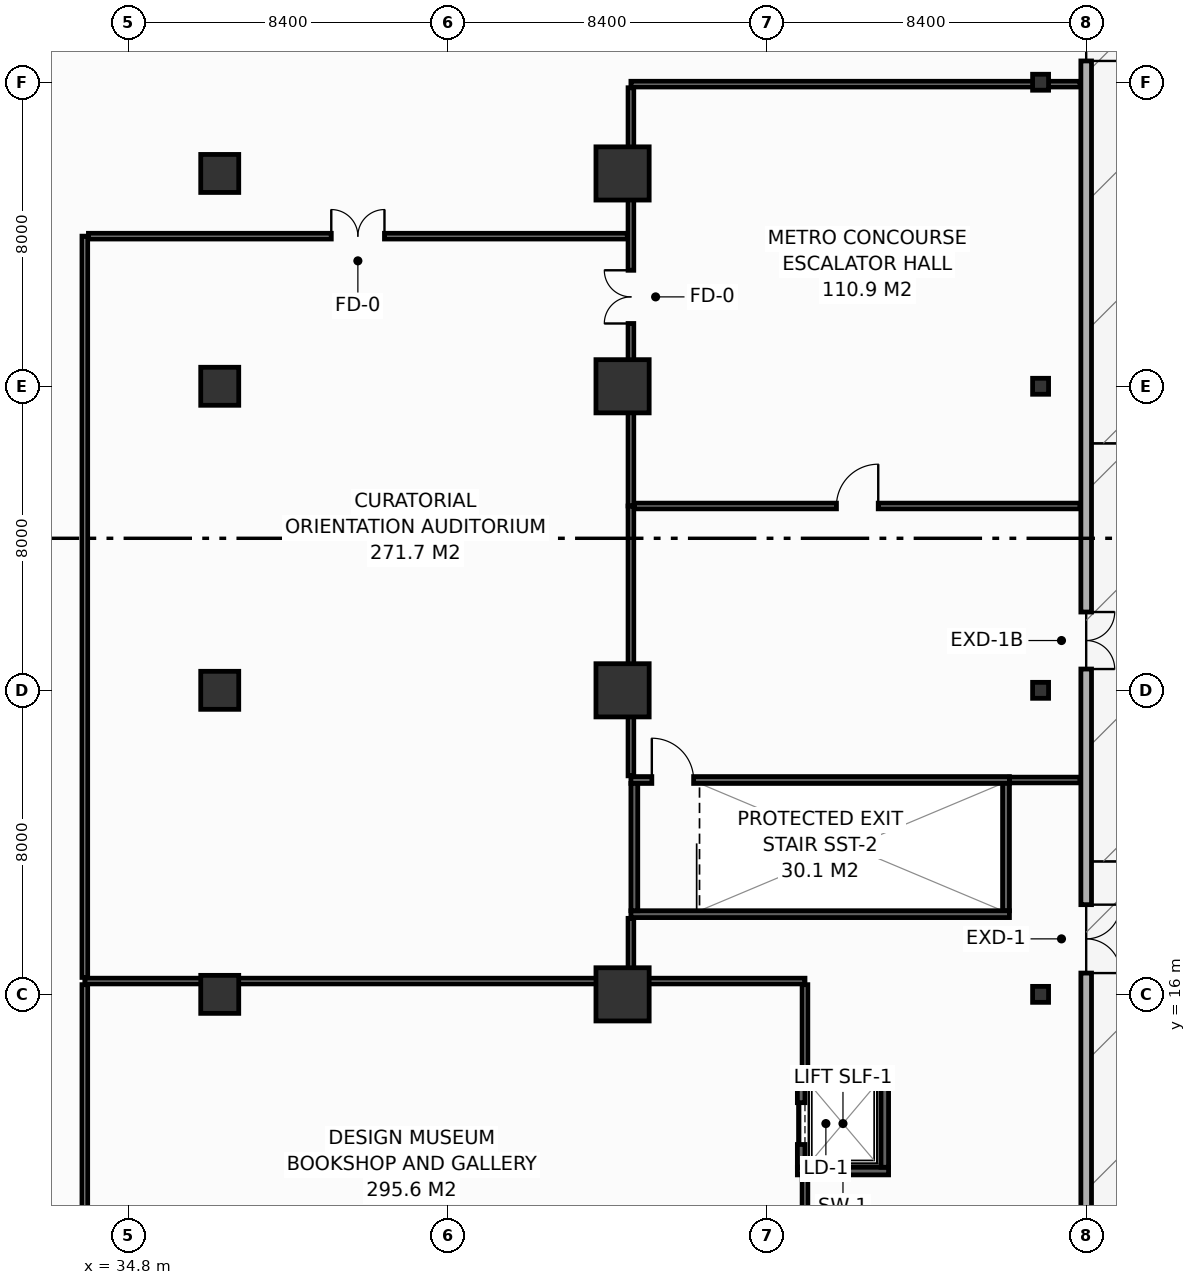
"""IFC4 building model, lengths in metres.
Left out: names, types, materials, properties, quantities, classifications, styles, units other than length and angle.
Written with IfcOpenShell. Run it as: python <this file> out.ifc"""

import sys

from ifc_helpers import new_model, si_unit, direction, frame, frame_2d, origin, origin_2d, place, context, subcontext, project, spatial, rectangle, hollow_rectangle, i_section, extrude, element, fill, save


model = new_model("IFC4")
c1 = context("Model", 3, precision=1e-05, world=origin(), true_north=direction((0.0, 1.0)))
c2 = subcontext(c1, "Body", "Model", "MODEL_VIEW")
j1 = project(units=[si_unit("LENGTHUNIT", "METRE"), si_unit("PLANEANGLEUNIT", "RADIAN")], contexts=[c1])
p1 = place(None, origin())
s1 = spatial("IfcSite", under=j1, at=p1, CompositionType="ELEMENT")
p2 = place(p1, origin())
s2 = spatial("IfcBuilding", under=s1, at=p2, CompositionType="ELEMENT")
p3 = place(p2, origin())
s3 = spatial("IfcBuildingStorey", under=s2, at=p3, CompositionType="ELEMENT", Elevation=0.0)
p4 = place(p3, frame((37.2, 16.0, 0.0), z_axis=(0.0, 0.0, 1.0), x_axis=(1.0, 0.0, 0.0)))
e1 = element("IfcColumn", 1, at=p4, inside=s3, PredefinedType="COLUMN", context=c2, shape_type="SweptSolid", body=[
    extrude(hollow_rectangle(XDim=1.0, YDim=1.0, WallThickness=0.045, at=origin_2d()), origin(), (0.0, 0.0, 1.0), 6.0),
])
p5 = place(p3, frame((47.8, 16.0, 0.0), z_axis=(0.0, 0.0, 1.0), x_axis=(1.0, 0.0, 0.0)))
e2 = element("IfcColumn", 2, at=p5, inside=s3, PredefinedType="COLUMN", context=c2, shape_type="SweptSolid", body=[
    extrude(hollow_rectangle(XDim=1.4, YDim=1.4, WallThickness=0.065, at=origin_2d()), origin(), (0.0, 0.0, 1.0), 6.0),
])
p6 = place(p3, frame((37.2, 24.0, 0.0), z_axis=(0.0, 0.0, 1.0), x_axis=(1.0, 0.0, 0.0)))
e3 = element("IfcColumn", 3, at=p6, inside=s3, PredefinedType="COLUMN", context=c2, shape_type="SweptSolid", body=[
    extrude(hollow_rectangle(XDim=1.0, YDim=1.0, WallThickness=0.045, at=origin_2d()), origin(), (0.0, 0.0, 1.0), 6.0),
])
p7 = place(p3, frame((47.8, 24.0, 0.0), z_axis=(0.0, 0.0, 1.0), x_axis=(1.0, 0.0, 0.0)))
e4 = element("IfcColumn", 4, at=p7, inside=s3, PredefinedType="COLUMN", context=c2, shape_type="SweptSolid", body=[
    extrude(hollow_rectangle(XDim=1.4, YDim=1.4, WallThickness=0.065, at=origin_2d()), origin(), (0.0, 0.0, 1.0), 6.0),
])
p8 = place(p3, frame((37.2, 32.0, 0.0), z_axis=(0.0, 0.0, 1.0), x_axis=(1.0, 0.0, 0.0)))
e5 = element("IfcColumn", 5, at=p8, inside=s3, PredefinedType="COLUMN", context=c2, shape_type="SweptSolid", body=[
    extrude(hollow_rectangle(XDim=1.0, YDim=1.0, WallThickness=0.045, at=origin_2d()), origin(), (0.0, 0.0, 1.0), 6.0),
])
p9 = place(p3, frame((47.8, 32.0, 0.0), z_axis=(0.0, 0.0, 1.0), x_axis=(1.0, 0.0, 0.0)))
e6 = element("IfcColumn", 6, at=p9, inside=s3, PredefinedType="COLUMN", context=c2, shape_type="SweptSolid", body=[
    extrude(hollow_rectangle(XDim=1.4, YDim=1.4, WallThickness=0.065, at=origin_2d()), origin(), (0.0, 0.0, 1.0), 6.0),
])
p10 = place(p3, frame((37.2, 37.6, 0.0), z_axis=(0.0, 0.0, 1.0), x_axis=(1.0, 0.0, 0.0)))
e7 = element("IfcColumn", 7, at=p10, inside=s3, PredefinedType="COLUMN", context=c2, shape_type="SweptSolid", body=[
    extrude(hollow_rectangle(XDim=1.0, YDim=1.0, WallThickness=0.045, at=origin_2d()), origin(), (0.0, 0.0, 1.0), 6.0),
])
p11 = place(p3, frame((47.8, 37.6, 0.0), z_axis=(0.0, 0.0, 1.0), x_axis=(1.0, 0.0, 0.0)))
e8 = element("IfcColumn", 8, at=p11, inside=s3, PredefinedType="COLUMN", context=c2, shape_type="SweptSolid", body=[
    extrude(hollow_rectangle(XDim=1.4, YDim=1.4, WallThickness=0.065, at=origin_2d()), origin(), (0.0, 0.0, 1.0), 6.0),
])
for number, where, z_axis, x_axis in (
    (9, (58.8, 16.0, 0.0), (0.0, 0.0, 1.0), (1.0, 0.0, 0.0)),
    (10, (58.8, 24.0, 0.0), (0.0, 0.0, 1.0), (1.0, 0.0, 0.0)),
    (11, (58.8, 32.0, 0.0), (0.0, 0.0, 1.0), (1.0, 0.0, 0.0)),
    (12, (58.8, 40.0, 0.0), (0.0, 0.0, 1.0), (1.0, 0.0, 0.0)),
):
    element("IfcColumn", number, at=place(p3, frame(where, z_axis=z_axis, x_axis=x_axis)), inside=s3, PredefinedType="COLUMN", context=c2, shape_type="SweptSolid", body=[
        extrude(i_section(OverallWidth=0.42, OverallDepth=0.42, WebThickness=0.02, FlangeThickness=0.035, FilletRadius=0.022, at=origin_2d()), origin(), (0.0, 0.0, 1.0), 6.0),
    ])
for number, where, z_axis, x_axis in (
    (13, (52.4, 11.35, 0.0), (0.0, 0.0, 1.0), (1.0, 0.0, 0.0)),
    (14, (52.4, 13.85, 0.0), (0.0, 0.0, 1.0), (1.0, 0.0, 0.0)),
):
    element("IfcWall", number, at=place(p3, frame(where, z_axis=z_axis, x_axis=x_axis)), inside=s3, PredefinedType="SHEAR", context=c2, shape_type="SweptSolid", body=[
        extrude(rectangle(XDim=2.4, YDim=0.2, at=frame_2d((1.2, 0.0))), origin(), (0.0, 0.0, 1.0), 5.48),
    ])
p12 = place(p3, frame((52.5, 11.45, 0.0), z_axis=(0.0, 0.0, 1.0), x_axis=(0.0, 1.0, 0.0)))
e15 = element("IfcWall", 15, at=p12, inside=s3, PredefinedType="SHEAR", context=c2, shape_type="SweptSolid", body=[
    extrude(rectangle(XDim=2.3, YDim=0.2, at=frame_2d((1.15, 0.0))), origin(), (0.0, 0.0, 1.0), 5.48),
])
p13 = place(p12, frame((0.6, 0.0, 0.0)))
e16 = element("IfcOpeningElement", 16, at=p13, cuts=e15, PredefinedType="OPENING", context=c2, shape_type="SweptSolid", body=[
    extrude(rectangle(XDim=1.1, YDim=2.2, at=frame_2d((0.55, 1.1))), frame((0.0, 0.11, 0.0), z_axis=(0.0, -1.0, 0.0), x_axis=(1.0, 0.0, 0.0)), (0.0, 0.0, 1.0), 0.22),
])
p14 = place(p3, frame((54.7, 11.45, 0.0), z_axis=(0.0, 0.0, 1.0), x_axis=(0.0, 1.0, 0.0)))
e17 = element("IfcWall", 17, at=p14, inside=s3, PredefinedType="SHEAR", context=c2, shape_type="SweptSolid", body=[
    extrude(rectangle(XDim=2.3, YDim=0.2, at=frame_2d((1.15, 0.0))), origin(), (0.0, 0.0, 1.0), 5.48),
])
p15 = place(p3, frame((48.02, 21.64, 0.0), z_axis=(0.0, 0.0, 1.0), x_axis=(1.0, 0.0, 0.0)))
e18 = element("IfcWall", 18, at=p15, inside=s3, PredefinedType="SHEAR", context=c2, shape_type="SweptSolid", body=[
    extrude(rectangle(XDim=9.96, YDim=0.18, at=frame_2d((4.98, 0.0))), origin(), (0.0, 0.0, 1.0), 5.7),
])
p16 = place(p15, frame((0.55, 0.0, 0.0)))
e19 = element("IfcOpeningElement", 19, at=p16, cuts=e18, PredefinedType="OPENING", context=c2, shape_type="SweptSolid", body=[
    extrude(rectangle(XDim=1.1, YDim=2.15, at=frame_2d((0.55, 1.075))), frame((0.0, 0.1, 0.0), z_axis=(0.0, -1.0, 0.0), x_axis=(1.0, 0.0, 0.0)), (0.0, 0.0, 1.0), 0.2),
])
p17 = place(p3, frame((57.89, 21.55, 0.0), z_axis=(0.0, 0.0, 1.0), x_axis=(0.0, -1.0, 0.0)))
e20 = element("IfcWall", 20, at=p17, inside=s3, PredefinedType="SHEAR", context=c2, shape_type="SweptSolid", body=[
    extrude(rectangle(XDim=3.35, YDim=0.18, at=frame_2d((1.675, 0.0))), origin(), (0.0, 0.0, 1.0), 5.7),
])
p18 = place(p3, frame((57.98, 18.11, 0.0), z_axis=(0.0, 0.0, 1.0), x_axis=(-1.0, 0.0, 0.0)))
e21 = element("IfcWall", 21, at=p18, inside=s3, PredefinedType="SHEAR", context=c2, shape_type="SweptSolid", body=[
    extrude(rectangle(XDim=9.96, YDim=0.18, at=frame_2d((4.98, 0.0))), origin(), (0.0, 0.0, 1.0), 5.7),
])
p19 = place(p3, frame((48.11, 18.2, 0.0), z_axis=(0.0, 0.0, 1.0), x_axis=(0.0, 1.0, 0.0)))
e22 = element("IfcWall", 22, at=p19, inside=s3, PredefinedType="SHEAR", context=c2, shape_type="SweptSolid", body=[
    extrude(rectangle(XDim=3.35, YDim=0.18, at=frame_2d((1.675, 0.0))), origin(), (0.0, 0.0, 1.0), 5.7),
])
p20 = place(p3, frame((60.0, 52.64, 0.0), z_axis=(0.0, 0.0, 1.0), x_axis=(0.0, -1.0, 0.0)))
e23 = element("IfcWall", 23, at=p20, inside=s3, PredefinedType="STANDARD", context=c2, shape_type="SweptSolid", body=[
    extrude(rectangle(XDim=49.28, YDim=0.28, at=frame_2d((24.64, 0.0))), origin(), (0.0, 0.0, 1.0), 5.7),
])
p21 = place(p20, frame((34.28, 0.0, 0.0)))
e24 = element("IfcOpeningElement", 24, at=p21, cuts=e23, PredefinedType="OPENING", context=c2, shape_type="SweptSolid", body=[
    extrude(rectangle(XDim=1.8, YDim=2.4, at=frame_2d((0.9, 1.2))), frame((0.0, 0.15, 0.0), z_axis=(0.0, -1.0, 0.0), x_axis=(1.0, 0.0, 0.0)), (0.0, 0.0, 1.0), 0.3),
])
p22 = place(p20, frame((26.58, 0.0, 0.0)))
e25 = element("IfcOpeningElement", 25, at=p22, cuts=e23, PredefinedType="OPENING", context=c2, shape_type="SweptSolid", body=[
    extrude(rectangle(XDim=1.5, YDim=2.35, at=frame_2d((0.75, 1.175))), frame((0.0, 0.15, 0.0), z_axis=(0.0, -1.0, 0.0), x_axis=(1.0, 0.0, 0.0)), (0.0, 0.0, 1.0), 0.3),
])
p23 = place(p20, frame((10.88, 0.0, 0.0)))
e26 = element("IfcOpeningElement", 26, at=p23, cuts=e23, PredefinedType="OPENING", context=c2, shape_type="SweptSolid", body=[
    extrude(rectangle(XDim=1.2, YDim=2.25, at=frame_2d((0.6, 1.125))), frame((0.0, 0.15, 0.0), z_axis=(0.0, -1.0, 0.0), x_axis=(1.0, 0.0, 0.0)), (0.0, 0.0, 1.0), 0.3),
])
p24 = place(p3, frame((48.02, 39.95, 0.0), z_axis=(0.0, 0.0, 1.0), x_axis=(1.0, 0.0, 0.0)))
e27 = element("IfcWall", 27, at=p24, inside=s3, PredefinedType="PARTITIONING", context=c2, shape_type="SweptSolid", body=[
    extrude(rectangle(XDim=11.82, YDim=0.15, at=frame_2d((5.91, 0.0))), origin(), (0.0, 0.0, 1.0), 4.785),
])
p25 = place(p3, frame((48.02, 28.85, 0.0), z_axis=(0.0, 0.0, 1.0), x_axis=(0.0, 1.0, 0.0)))
e28 = element("IfcWall", 28, at=p25, inside=s3, PredefinedType="PARTITIONING", context=c2, shape_type="SweptSolid", body=[
    extrude(rectangle(XDim=11.005, YDim=0.15, at=frame_2d((5.502, 0.0))), origin(), (0.0, 0.0, 1.0), 4.785),
])
p26 = place(p25, frame((4.802, 0.0, 0.0)))
e29 = element("IfcOpeningElement", 29, at=p26, cuts=e28, PredefinedType="OPENING", context=c2, shape_type="SweptSolid", body=[
    extrude(rectangle(XDim=1.4, YDim=2.2, at=frame_2d((0.7, 1.1))), frame((0.0, 0.085, 0.0), z_axis=(0.0, -1.0, 0.0), x_axis=(1.0, 0.0, 0.0)), (0.0, 0.0, 1.0), 0.17),
])
p27 = place(p3, frame((33.65, 16.35, 0.0), z_axis=(0.0, 0.0, 1.0), x_axis=(1.0, 0.0, 0.0)))
e30 = element("IfcWall", 30, at=p27, inside=s3, PredefinedType="PARTITIONING", context=c2, shape_type="SweptSolid", body=[
    extrude(rectangle(XDim=18.95, YDim=0.15, at=frame_2d((9.475, 0.0))), origin(), (0.0, 0.0, 1.0), 4.285),
])
p28 = place(p3, frame((52.6, 0.16, 0.0), z_axis=(0.0, 0.0, 1.0), x_axis=(0.0, 1.0, 0.0)))
e31 = element("IfcWall", 31, at=p28, inside=s3, PredefinedType="PARTITIONING", context=c2, shape_type="SweptSolid", body=[
    extrude(rectangle(XDim=11.07, YDim=0.15, at=frame_2d((5.535, 0.0))), origin(), (0.0, 0.0, 1.0), 4.785),
])
p29 = place(p3, frame((52.6, 13.97, 0.0), z_axis=(0.0, 0.0, 1.0), x_axis=(0.0, 1.0, 0.0)))
e32 = element("IfcWall", 32, at=p29, inside=s3, PredefinedType="PARTITIONING", context=c2, shape_type="SweptSolid", body=[
    extrude(rectangle(XDim=2.285, YDim=0.15, at=frame_2d((1.143, 0.0))), origin(), (0.0, 0.0, 1.0), 4.785),
])
p30 = place(p3, frame((33.65, 0.16, 0.0), z_axis=(0.0, 0.0, 1.0), x_axis=(0.0, 1.0, 0.0)))
e33 = element("IfcWall", 33, at=p30, inside=s3, PredefinedType="PARTITIONING", context=c2, shape_type="SweptSolid", body=[
    extrude(rectangle(XDim=16.095, YDim=0.15, at=frame_2d((8.047, 0.0))), origin(), (0.0, 0.0, 1.0), 4.285),
])
p31 = place(p30, frame((7.297, 0.0, 0.0)))
e34 = element("IfcOpeningElement", 34, at=p31, cuts=e33, PredefinedType="OPENING", context=c2, shape_type="SweptSolid", body=[
    extrude(rectangle(XDim=1.5, YDim=2.2, at=frame_2d((0.75, 1.1))), frame((0.0, 0.085, 0.0), z_axis=(0.0, -1.0, 0.0), x_axis=(1.0, 0.0, 0.0)), (0.0, 0.0, 1.0), 0.17),
])
p32 = place(p3, frame((33.65, 16.445, 0.0), z_axis=(0.0, 0.0, 1.0), x_axis=(0.0, 1.0, 0.0)))
e35 = element("IfcWall", 35, at=p32, inside=s3, PredefinedType="PARTITIONING", context=c2, shape_type="SweptSolid", body=[
    extrude(rectangle(XDim=19.505, YDim=0.15, at=frame_2d((9.752, 0.0))), origin(), (0.0, 0.0, 1.0), 5.185),
])
p33 = place(p3, frame((48.02, 21.75, 0.0), z_axis=(0.0, 0.0, 1.0), x_axis=(0.0, 1.0, 0.0)))
e36 = element("IfcWall", 36, at=p33, inside=s3, PredefinedType="PARTITIONING", context=c2, shape_type="SweptSolid", body=[
    extrude(rectangle(XDim=7.1, YDim=0.15, at=frame_2d((3.55, 0.0))), origin(), (0.0, 0.0, 1.0), 4.785),
])
p34 = place(p3, frame((48.02, 16.445, 0.0), z_axis=(0.0, 0.0, 1.0), x_axis=(0.0, 1.0, 0.0)))
e37 = element("IfcWall", 37, at=p34, inside=s3, PredefinedType="PARTITIONING", context=c2, shape_type="SweptSolid", body=[
    extrude(rectangle(XDim=1.555, YDim=0.15, at=frame_2d((0.777, 0.0))), origin(), (0.0, 0.0, 1.0), 4.785),
])
p35 = place(p3, frame((33.745, 35.95, 0.0), z_axis=(0.0, 0.0, 1.0), x_axis=(1.0, 0.0, 0.0)))
e38 = element("IfcWall", 38, at=p35, inside=s3, PredefinedType="PARTITIONING", context=c2, shape_type="SweptSolid", body=[
    extrude(rectangle(XDim=14.18, YDim=0.15, at=frame_2d((7.09, 0.0))), origin(), (0.0, 0.0, 1.0), 4.785),
])
p36 = place(p35, frame((6.39, 0.0, 0.0)))
e39 = element("IfcOpeningElement", 39, at=p36, cuts=e38, PredefinedType="OPENING", context=c2, shape_type="SweptSolid", body=[
    extrude(rectangle(XDim=1.4, YDim=2.2, at=frame_2d((0.7, 1.1))), frame((0.0, 0.085, 0.0), z_axis=(0.0, -1.0, 0.0), x_axis=(1.0, 0.0, 0.0)), (0.0, 0.0, 1.0), 0.17),
])
p37 = place(p3, frame((57.98, 21.64, 0.0), z_axis=(0.0, 0.0, 1.0), x_axis=(1.0, 0.0, 0.0)))
e40 = element("IfcWall", 40, at=p37, inside=s3, PredefinedType="PARTITIONING", context=c2, shape_type="SweptSolid", body=[
    extrude(rectangle(XDim=1.86, YDim=0.15, at=frame_2d((0.93, 0.0))), origin(), (0.0, 0.0, 1.0), 4.785),
])
p38 = place(p3, frame((48.115, 28.85, 0.0), z_axis=(0.0, 0.0, 1.0), x_axis=(1.0, 0.0, 0.0)))
e41 = element("IfcWall", 41, at=p38, inside=s3, PredefinedType="PARTITIONING", context=c2, shape_type="SweptSolid", body=[
    extrude(rectangle(XDim=11.725, YDim=0.15, at=frame_2d((5.863, 0.0))), origin(), (0.0, 0.0, 1.0), 4.785),
])
p39 = place(p38, frame((5.313, 0.0, 0.0)))
e42 = element("IfcOpeningElement", 42, at=p39, cuts=e41, PredefinedType="OPENING", context=c2, shape_type="SweptSolid", body=[
    extrude(rectangle(XDim=1.1, YDim=2.15, at=frame_2d((0.55, 1.075))), frame((0.0, 0.085, 0.0), z_axis=(0.0, -1.0, 0.0), x_axis=(1.0, 0.0, 0.0)), (0.0, 0.0, 1.0), 0.17),
])
p40 = place(p13, origin())
e43 = element("IfcDoor", 43, at=p40, inside=s3, OperationType="SLIDING_TO_LEFT", PredefinedType="DOOR", context=c2, shape_type="SweptSolid", body=[
    extrude(rectangle(XDim=1.1, YDim=2.2, at=frame_2d((0.55, 1.1))), frame((0.0, 0.025, 0.0), z_axis=(0.0, -1.0, 0.0), x_axis=(1.0, 0.0, 0.0)), (0.0, 0.0, 1.0), 0.05),
])
fill(e16, e43)
p41 = place(p16, origin())
e44 = element("IfcDoor", 44, at=p41, inside=s3, OperationType="SINGLE_SWING_LEFT", PredefinedType="DOOR", context=c2, shape_type="SweptSolid", body=[
    extrude(rectangle(XDim=1.1, YDim=2.15, at=frame_2d((0.55, 1.075))), frame((0.0, 0.025, 0.0), z_axis=(0.0, -1.0, 0.0), x_axis=(1.0, 0.0, 0.0)), (0.0, 0.0, 1.0), 0.05),
])
fill(e19, e44)
p42 = place(p21, origin())
e45 = element("IfcDoor", 45, at=p42, inside=s3, OperationType="DOUBLE_DOOR_SINGLE_SWING", PredefinedType="DOOR", context=c2, shape_type="SweptSolid", body=[
    extrude(rectangle(XDim=1.8, YDim=2.4, at=frame_2d((0.9, 1.2))), frame((0.0, 0.025, 0.0), z_axis=(0.0, -1.0, 0.0), x_axis=(1.0, 0.0, 0.0)), (0.0, 0.0, 1.0), 0.05),
])
fill(e24, e45)
p43 = place(p22, origin())
e46 = element("IfcDoor", 46, at=p43, inside=s3, OperationType="DOUBLE_DOOR_SINGLE_SWING", PredefinedType="DOOR", context=c2, shape_type="SweptSolid", body=[
    extrude(rectangle(XDim=1.5, YDim=2.35, at=frame_2d((0.75, 1.175))), frame((0.0, 0.025, 0.0), z_axis=(0.0, -1.0, 0.0), x_axis=(1.0, 0.0, 0.0)), (0.0, 0.0, 1.0), 0.05),
])
fill(e25, e46)
p44 = place(p23, origin())
e47 = element("IfcDoor", 47, at=p44, inside=s3, OperationType="SINGLE_SWING_RIGHT", PredefinedType="DOOR", context=c2, shape_type="SweptSolid", body=[
    extrude(rectangle(XDim=1.2, YDim=2.25, at=frame_2d((0.6, 1.125))), frame((0.0, 0.025, 0.0), z_axis=(0.0, -1.0, 0.0), x_axis=(1.0, 0.0, 0.0)), (0.0, 0.0, 1.0), 0.05),
])
fill(e26, e47)
p45 = place(p26, origin())
e48 = element("IfcDoor", 48, at=p45, inside=s3, OperationType="DOUBLE_DOOR_SINGLE_SWING", PredefinedType="DOOR", context=c2, shape_type="SweptSolid", body=[
    extrude(rectangle(XDim=1.4, YDim=2.2, at=frame_2d((0.7, 1.1))), frame((0.0, 0.025, 0.0), z_axis=(0.0, -1.0, 0.0), x_axis=(1.0, 0.0, 0.0)), (0.0, 0.0, 1.0), 0.05),
])
fill(e29, e48)
p46 = place(p36, origin())
e49 = element("IfcDoor", 49, at=p46, inside=s3, OperationType="DOUBLE_DOOR_SINGLE_SWING", PredefinedType="DOOR", context=c2, shape_type="SweptSolid", body=[
    extrude(rectangle(XDim=1.4, YDim=2.2, at=frame_2d((0.7, 1.1))), frame((0.0, 0.025, 0.0), z_axis=(0.0, -1.0, 0.0), x_axis=(1.0, 0.0, 0.0)), (0.0, 0.0, 1.0), 0.05),
])
fill(e39, e49)
p47 = place(p39, origin())
e50 = element("IfcDoor", 50, at=p47, inside=s3, OperationType="SINGLE_SWING_RIGHT", PredefinedType="DOOR", context=c2, shape_type="SweptSolid", body=[
    extrude(rectangle(XDim=1.1, YDim=2.15, at=frame_2d((0.55, 1.075))), frame((0.0, 0.025, 0.0), z_axis=(0.0, -1.0, 0.0), x_axis=(1.0, 0.0, 0.0)), (0.0, 0.0, 1.0), 0.05),
])
fill(e42, e50)
save(model, sys.argv[1])
